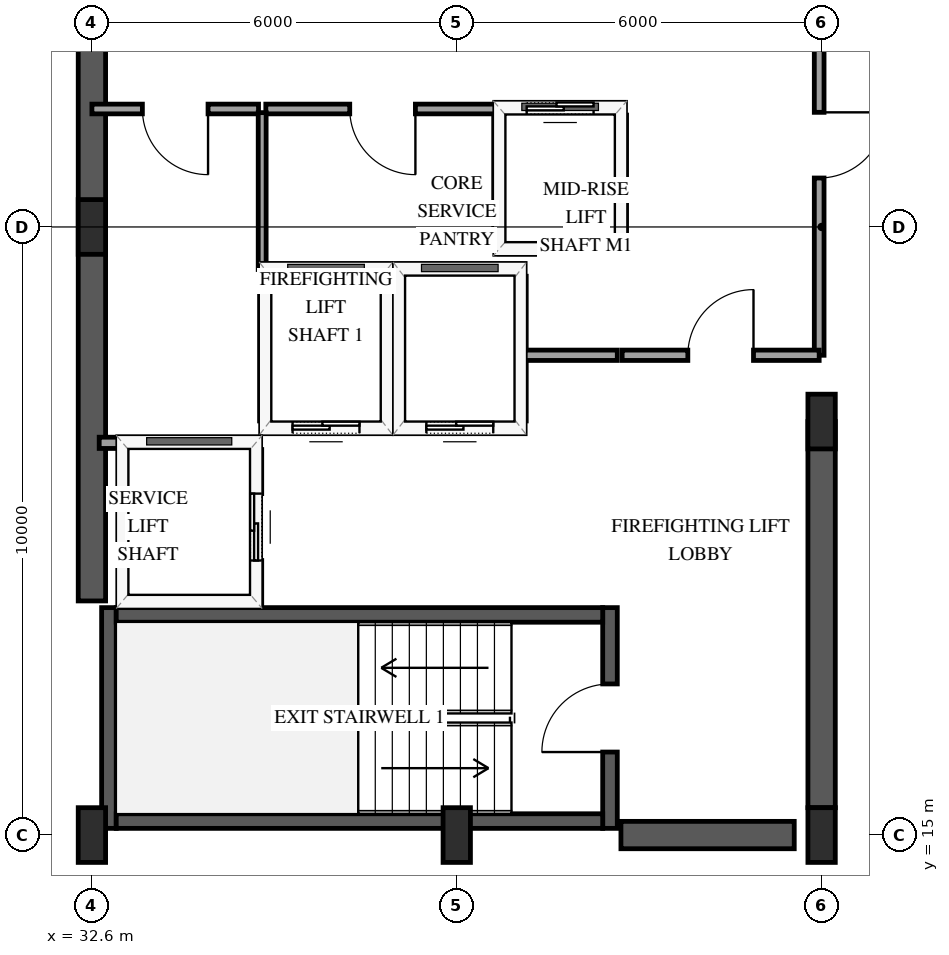
"""IFC4 building model, lengths in metres.
Left out: names, types, materials, properties, quantities, classifications, styles, units other than length and angle.
Written with IfcOpenShell. Run it as: python <this file> out.ifc"""

import sys

from ifc_helpers import new_model, si_unit, direction, frame, frame_2d, origin, origin_2d, place, context, subcontext, project, spatial, rectangle, extrude, element, fill, save


model = new_model("IFC4")
c1 = context("Model", 3, precision=1e-05, world=origin(), true_north=direction((0.0, 1.0)))
c2 = subcontext(c1, "Body", "Model", "MODEL_VIEW")
j1 = project(units=[si_unit("LENGTHUNIT", "METRE"), si_unit("PLANEANGLEUNIT", "RADIAN")], contexts=[c1])
p1 = place(None, origin())
s1 = spatial("IfcSite", under=j1, at=p1, CompositionType="ELEMENT")
p2 = place(p1, origin())
s2 = spatial("IfcBuilding", under=s1, at=p2, CompositionType="ELEMENT")
p3 = place(p2, frame((0.0, 0.0, 201.4)))
s3 = spatial("IfcBuildingStorey", under=s2, at=p3, CompositionType="ELEMENT", Elevation=201.4)
p4 = place(p3, frame((32.88, 15.11, 0.0), z_axis=(0.0, 0.0, 1.0), x_axis=(0.0, 1.0, 0.0)))
e1 = element("IfcWall", 1, at=p4, inside=s3, PredefinedType="SHEAR", context=c2, shape_type="SweptSolid", body=[
    extrude(rectangle(XDim=3.63, YDim=0.24, at=frame_2d((1.815, 0.0))), origin(), (0.0, 0.0, 1.0), 3.6),
])
p5 = place(p3, frame((41.12, 15.11, 0.0), z_axis=(0.0, 0.0, 1.0), x_axis=(0.0, 1.0, 0.0)))
e2 = element("IfcWall", 2, at=p5, inside=s3, PredefinedType="SHEAR", context=c2, shape_type="SweptSolid", body=[
    extrude(rectangle(XDim=3.63, YDim=0.24, at=frame_2d((1.815, 0.0))), origin(), (0.0, 0.0, 1.0), 3.6),
])
p6 = place(p5, frame((1.255, 0.0, 0.0)))
e3 = element("IfcOpeningElement", 3, at=p6, cuts=e2, PredefinedType="OPENING", context=c2, shape_type="SweptSolid", body=[
    extrude(rectangle(XDim=1.12, YDim=2.15, at=frame_2d((0.56, 1.075))), frame((0.0, 0.13, 0.0), z_axis=(0.0, -1.0, 0.0), x_axis=(1.0, 0.0, 0.0)), (0.0, 0.0, 1.0), 0.26),
])
for number, where, z_axis, x_axis in (
    (4, (33.0, 15.23, 0.0), (0.0, 0.0, 1.0), (1.0, 0.0, 0.0)),
    (5, (33.0, 18.62, 0.0), (0.0, 0.0, 1.0), (1.0, 0.0, 0.0)),
):
    element("IfcWall", number, at=place(p3, frame(where, z_axis=z_axis, x_axis=x_axis)), inside=s3, PredefinedType="SHEAR", context=c2, shape_type="SweptSolid", body=[
        extrude(rectangle(XDim=8.0, YDim=0.24, at=frame_2d((4.0, 0.0))), origin(), (0.0, 0.0, 1.0), 3.6),
    ])
p7 = place(p3, frame((32.6, 18.85, 0.0), z_axis=(0.0, 0.0, 1.0), x_axis=(0.0, 1.0, 0.0)))
e6 = element("IfcWall", 6, at=p7, inside=s3, PredefinedType="SHEAR", context=c2, shape_type="SweptSolid", body=[
    extrude(rectangle(XDim=12.3, YDim=0.45, at=frame_2d((6.15, 0.0))), origin(), (0.0, 0.0, 1.0), 3.6),
])
p8 = place(p3, frame((41.3, 15.0, 0.0), z_axis=(0.0, 0.0, 1.0), x_axis=(1.0, 0.0, 0.0)))
e7 = element("IfcWall", 7, at=p8, inside=s3, PredefinedType="SHEAR", context=c2, shape_type="SweptSolid", body=[
    extrude(rectangle(XDim=2.85, YDim=0.45, at=frame_2d((1.425, 0.0))), origin(), (0.0, 0.0, 1.0), 3.6),
])
p9 = place(p3, frame((44.6, 15.45, 0.0), z_axis=(0.0, 0.0, 1.0), x_axis=(0.0, 1.0, 0.0)))
e8 = element("IfcWall", 8, at=p9, inside=s3, PredefinedType="SHEAR", context=c2, shape_type="SweptSolid", body=[
    extrude(rectangle(XDim=6.35, YDim=0.45, at=frame_2d((3.175, 0.0))), origin(), (0.0, 0.0, 1.0), 3.6),
])
for number, where, z_axis, x_axis in (
    (9, (32.6, 15.0, 0.0), (0.0, 0.0, 1.0), (1.0, 0.0, 0.0)),
    (10, (32.6, 25.0, 0.0), (0.0, 0.0, 1.0), (1.0, 0.0, 0.0)),
    (11, (38.6, 15.0, 0.0), (0.0, 0.0, 1.0), (1.0, 0.0, 0.0)),
    (12, (44.6, 15.0, 0.0), (0.0, 0.0, 1.0), (1.0, 0.0, 0.0)),
    (13, (44.6, 21.8, 0.0), (0.0, 0.0, 1.0), (1.0, 0.0, 0.0)),
):
    element("IfcColumn", number, at=place(p3, frame(where, z_axis=z_axis, x_axis=x_axis)), inside=s3, PredefinedType="PILASTER", context=c2, shape_type="SweptSolid", body=[
        extrude(rectangle(XDim=0.45, YDim=0.9, at=origin_2d()), origin(), (0.0, 0.0, 1.0), 3.6),
    ])
p10 = place(p3, frame((35.45, 21.7, 0.0), z_axis=(0.0, 0.0, 1.0), x_axis=(1.0, 0.0, 0.0)))
e14 = element("IfcWall", 14, at=p10, inside=s3, PredefinedType="SOLIDWALL", context=c2, shape_type="SweptSolid", body=[
    extrude(rectangle(XDim=2.0, YDim=0.185, at=frame_2d((1.0, 0.0))), origin(), (0.0, 0.0, 1.0), 3.3),
])
p11 = place(p10, frame((0.45, 0.0, 0.0)))
e15 = element("IfcOpeningElement", 15, at=p11, cuts=e14, PredefinedType="OPENING", context=c2, shape_type="SweptSolid", body=[
    extrude(rectangle(XDim=1.1, YDim=2.15, at=frame_2d((0.55, 1.075))), frame((0.0, 0.103, 0.0), z_axis=(0.0, -1.0, 0.0), x_axis=(1.0, 0.0, 0.0)), (0.0, 0.0, 1.0), 0.205),
])
p12 = place(p3, frame((35.45, 24.3, 0.0), z_axis=(0.0, 0.0, 1.0), x_axis=(1.0, 0.0, 0.0)))
e16 = element("IfcWall", 16, at=p12, inside=s3, PredefinedType="SOLIDWALL", context=c2, shape_type="SweptSolid", body=[
    extrude(rectangle(XDim=2.0, YDim=0.185, at=frame_2d((1.0, 0.0))), origin(), (0.0, 0.0, 1.0), 3.3),
])
for number, where, z_axis, x_axis in (
    (17, (35.45, 21.81, 0.0), (0.0, 0.0, 1.0), (0.0, 1.0, 0.0)),
    (18, (37.45, 21.81, 0.0), (0.0, 0.0, 1.0), (0.0, 1.0, 0.0)),
):
    element("IfcWall", number, at=place(p3, frame(where, z_axis=z_axis, x_axis=x_axis)), inside=s3, PredefinedType="SOLIDWALL", context=c2, shape_type="SweptSolid", body=[
        extrude(rectangle(XDim=2.38, YDim=0.185, at=frame_2d((1.19, 0.0))), origin(), (0.0, 0.0, 1.0), 3.3),
    ])
p13 = place(p3, frame((37.65, 21.7, 0.0), z_axis=(0.0, 0.0, 1.0), x_axis=(1.0, 0.0, 0.0)))
e19 = element("IfcWall", 19, at=p13, inside=s3, PredefinedType="SOLIDWALL", context=c2, shape_type="SweptSolid", body=[
    extrude(rectangle(XDim=2.0, YDim=0.185, at=frame_2d((1.0, 0.0))), origin(), (0.0, 0.0, 1.0), 3.3),
])
p14 = place(p13, frame((0.45, 0.0, 0.0)))
e20 = element("IfcOpeningElement", 20, at=p14, cuts=e19, PredefinedType="OPENING", context=c2, shape_type="SweptSolid", body=[
    extrude(rectangle(XDim=1.1, YDim=2.15, at=frame_2d((0.55, 1.075))), frame((0.0, 0.103, 0.0), z_axis=(0.0, -1.0, 0.0), x_axis=(1.0, 0.0, 0.0)), (0.0, 0.0, 1.0), 0.205),
])
p15 = place(p3, frame((37.65, 24.3, 0.0), z_axis=(0.0, 0.0, 1.0), x_axis=(1.0, 0.0, 0.0)))
e21 = element("IfcWall", 21, at=p15, inside=s3, PredefinedType="SOLIDWALL", context=c2, shape_type="SweptSolid", body=[
    extrude(rectangle(XDim=2.0, YDim=0.185, at=frame_2d((1.0, 0.0))), origin(), (0.0, 0.0, 1.0), 3.3),
])
p16 = place(p3, frame((39.65, 21.81, 0.0), z_axis=(0.0, 0.0, 1.0), x_axis=(0.0, 1.0, 0.0)))
e22 = element("IfcWall", 22, at=p16, inside=s3, PredefinedType="SOLIDWALL", context=c2, shape_type="SweptSolid", body=[
    extrude(rectangle(XDim=2.38, YDim=0.185, at=frame_2d((1.19, 0.0))), origin(), (0.0, 0.0, 1.0), 3.3),
])
p17 = place(p3, frame((32.72, 21.45, 0.0), z_axis=(0.0, 0.0, 1.0), x_axis=(1.0, 0.0, 0.0)))
e23 = element("IfcWall", 23, at=p17, inside=s3, PredefinedType="SOLIDWALL", context=c2, shape_type="SweptSolid", body=[
    extrude(rectangle(XDim=2.58, YDim=0.185, at=frame_2d((1.29, 0.0))), origin(), (0.0, 0.0, 1.0), 3.3),
])
p18 = place(p3, frame((35.3, 18.79, 0.0), z_axis=(0.0, 0.0, 1.0), x_axis=(0.0, 1.0, 0.0)))
e24 = element("IfcWall", 24, at=p18, inside=s3, PredefinedType="SOLIDWALL", context=c2, shape_type="SweptSolid", body=[
    extrude(rectangle(XDim=2.55, YDim=0.185, at=frame_2d((1.275, 0.0))), origin(), (0.0, 0.0, 1.0), 3.3),
])
p19 = place(p18, frame((0.725, 0.0, 0.0)))
e25 = element("IfcOpeningElement", 25, at=p19, cuts=e24, PredefinedType="OPENING", context=c2, shape_type="SweptSolid", body=[
    extrude(rectangle(XDim=1.1, YDim=2.15, at=frame_2d((0.55, 1.075))), frame((0.0, 0.103, 0.0), z_axis=(0.0, -1.0, 0.0), x_axis=(1.0, 0.0, 0.0)), (0.0, 0.0, 1.0), 0.205),
])
p20 = place(p3, frame((39.3, 24.65, 0.0), z_axis=(0.0, 0.0, 1.0), x_axis=(1.0, 0.0, 0.0)))
e26 = element("IfcWall", 26, at=p20, inside=s3, PredefinedType="SOLIDWALL", context=c2, shape_type="SweptSolid", body=[
    extrude(rectangle(XDim=2.0, YDim=0.185, at=frame_2d((1.0, 0.0))), origin(), (0.0, 0.0, 1.0), 3.3),
])
p21 = place(p3, frame((39.3, 26.95, 0.0), z_axis=(0.0, 0.0, 1.0), x_axis=(1.0, 0.0, 0.0)))
e27 = element("IfcWall", 27, at=p21, inside=s3, PredefinedType="SOLIDWALL", context=c2, shape_type="SweptSolid", body=[
    extrude(rectangle(XDim=2.0, YDim=0.185, at=frame_2d((1.0, 0.0))), origin(), (0.0, 0.0, 1.0), 3.3),
])
p22 = place(p21, frame((0.45, 0.0, 0.0)))
e28 = element("IfcOpeningElement", 28, at=p22, cuts=e27, PredefinedType="OPENING", context=c2, shape_type="SweptSolid", body=[
    extrude(rectangle(XDim=1.1, YDim=2.15, at=frame_2d((0.55, 1.075))), frame((0.0, 0.103, 0.0), z_axis=(0.0, -1.0, 0.0), x_axis=(1.0, 0.0, 0.0)), (0.0, 0.0, 1.0), 0.205),
])
for number, where, z_axis, x_axis in (
    (29, (39.3, 24.76, 0.0), (0.0, 0.0, 1.0), (0.0, 1.0, 0.0)),
    (30, (41.3, 24.76, 0.0), (0.0, 0.0, 1.0), (0.0, 1.0, 0.0)),
):
    element("IfcWall", number, at=place(p3, frame(where, z_axis=z_axis, x_axis=x_axis)), inside=s3, PredefinedType="SOLIDWALL", context=c2, shape_type="SweptSolid", body=[
        extrude(rectangle(XDim=2.08, YDim=0.185, at=frame_2d((1.04, 0.0))), origin(), (0.0, 0.0, 1.0), 3.3),
    ])
p23 = place(p3, frame((44.56, 29.8, 0.0), z_axis=(0.0, 0.0, 1.0), x_axis=(0.0, -1.0, 0.0)))
e31 = element("IfcWall", 31, at=p23, inside=s3, PredefinedType="PARTITIONING", context=c2, shape_type="SweptSolid", body=[
    extrude(rectangle(XDim=6.91, YDim=0.16, at=frame_2d((3.455, 0.0))), origin(), (0.0, 0.0, 1.0), 2.34),
])
p24 = place(p23, frame((2.915, 0.0, 0.0)))
e32 = element("IfcOpeningElement", 32, at=p24, cuts=e31, PredefinedType="OPENING", context=c2, shape_type="SweptSolid", body=[
    extrude(rectangle(XDim=1.08, YDim=2.15, at=frame_2d((0.54, 1.075))), frame((0.0, 0.09, 0.0), z_axis=(0.0, -1.0, 0.0), x_axis=(1.0, 0.0, 0.0)), (0.0, 0.0, 1.0), 0.18),
])
p25 = place(p3, frame((39.3, 26.94, 0.0), z_axis=(0.0, 0.0, 1.0), x_axis=(-1.0, 0.0, 0.0)))
e33 = element("IfcWall", 33, at=p25, inside=s3, PredefinedType="PARTITIONING", context=c2, shape_type="SweptSolid", body=[
    extrude(rectangle(XDim=3.84, YDim=0.16, at=frame_2d((1.92, 0.0))), origin(), (0.0, 0.0, 1.0), 3.3),
])
p26 = place(p25, frame((1.38, 0.0, 0.0)))
e34 = element("IfcOpeningElement", 34, at=p26, cuts=e33, PredefinedType="OPENING", context=c2, shape_type="SweptSolid", body=[
    extrude(rectangle(XDim=1.08, YDim=2.15, at=frame_2d((0.54, 1.075))), frame((0.0, 0.09, 0.0), z_axis=(0.0, -1.0, 0.0), x_axis=(1.0, 0.0, 0.0)), (0.0, 0.0, 1.0), 0.18),
])
p27 = place(p3, frame((41.32, 22.89, 0.0), z_axis=(0.0, 0.0, 1.0), x_axis=(1.0, 0.0, 0.0)))
e35 = element("IfcWall", 35, at=p27, inside=s3, PredefinedType="PARTITIONING", context=c2, shape_type="SweptSolid", body=[
    extrude(rectangle(XDim=3.24, YDim=0.17, at=frame_2d((1.62, 0.0))), origin(), (0.0, 0.0, 1.0), 3.3),
])
p28 = place(p27, frame((1.08, 0.0, 0.0)))
e36 = element("IfcOpeningElement", 36, at=p28, cuts=e35, PredefinedType="OPENING", context=c2, shape_type="SweptSolid", body=[
    extrude(rectangle(XDim=1.08, YDim=2.15, at=frame_2d((0.54, 1.075))), frame((0.0, 0.095, 0.0), z_axis=(0.0, -1.0, 0.0), x_axis=(1.0, 0.0, 0.0)), (0.0, 0.0, 1.0), 0.19),
])
p29 = place(p3, frame((35.34, 26.94, 0.0), z_axis=(0.0, 0.0, 1.0), x_axis=(-1.0, 0.0, 0.0)))
e37 = element("IfcWall", 37, at=p29, inside=s3, PredefinedType="PARTITIONING", context=c2, shape_type="SweptSolid", body=[
    extrude(rectangle(XDim=2.74, YDim=0.16, at=frame_2d((1.37, 0.0))), origin(), (0.0, 0.0, 1.0), 3.3),
])
p30 = place(p29, frame((0.83, 0.0, 0.0)))
e38 = element("IfcOpeningElement", 38, at=p30, cuts=e37, PredefinedType="OPENING", context=c2, shape_type="SweptSolid", body=[
    extrude(rectangle(XDim=1.08, YDim=2.15, at=frame_2d((0.54, 1.075))), frame((0.0, 0.09, 0.0), z_axis=(0.0, -1.0, 0.0), x_axis=(1.0, 0.0, 0.0)), (0.0, 0.0, 1.0), 0.18),
])
p31 = place(p3, frame((35.4, 26.88, 0.0), z_axis=(0.0, 0.0, 1.0), x_axis=(0.0, -1.0, 0.0)))
e39 = element("IfcWall", 39, at=p31, inside=s3, PredefinedType="PARTITIONING", context=c2, shape_type="SweptSolid", body=[
    extrude(rectangle(XDim=2.58, YDim=0.13, at=frame_2d((1.29, 0.0))), origin(), (0.0, 0.0, 1.0), 3.3),
])
p32 = place(p3, frame((39.72, 22.89, 0.0), z_axis=(0.0, 0.0, 1.0), x_axis=(1.0, 0.0, 0.0)))
e40 = element("IfcWall", 40, at=p32, inside=s3, PredefinedType="PARTITIONING", context=c2, shape_type="SweptSolid", body=[
    extrude(rectangle(XDim=1.52, YDim=0.17, at=frame_2d((0.76, 0.0))), origin(), (0.0, 0.0, 1.0), 3.3),
])
p33 = place(p11, origin())
e41 = element("IfcDoor", 41, at=p33, inside=s3, OperationType="SLIDING_TO_LEFT", PredefinedType="DOOR", context=c2, shape_type="SweptSolid", body=[
    extrude(rectangle(XDim=1.1, YDim=2.15, at=frame_2d((0.55, 1.075))), frame((0.0, 0.025, 0.0), z_axis=(0.0, -1.0, 0.0), x_axis=(1.0, 0.0, 0.0)), (0.0, 0.0, 1.0), 0.05),
])
fill(e15, e41)
p34 = place(p14, origin())
e42 = element("IfcDoor", 42, at=p34, inside=s3, OperationType="SLIDING_TO_LEFT", PredefinedType="DOOR", context=c2, shape_type="SweptSolid", body=[
    extrude(rectangle(XDim=1.1, YDim=2.15, at=frame_2d((0.55, 1.075))), frame((0.0, 0.025, 0.0), z_axis=(0.0, -1.0, 0.0), x_axis=(1.0, 0.0, 0.0)), (0.0, 0.0, 1.0), 0.05),
])
fill(e20, e42)
p35 = place(p19, origin())
e43 = element("IfcDoor", 43, at=p35, inside=s3, OperationType="SLIDING_TO_LEFT", PredefinedType="DOOR", context=c2, shape_type="SweptSolid", body=[
    extrude(rectangle(XDim=1.1, YDim=2.15, at=frame_2d((0.55, 1.075))), frame((0.0, 0.025, 0.0), z_axis=(0.0, -1.0, 0.0), x_axis=(1.0, 0.0, 0.0)), (0.0, 0.0, 1.0), 0.05),
])
fill(e25, e43)
p36 = place(p22, origin())
e44 = element("IfcDoor", 44, at=p36, inside=s3, OperationType="SLIDING_TO_LEFT", PredefinedType="DOOR", context=c2, shape_type="SweptSolid", body=[
    extrude(rectangle(XDim=1.1, YDim=2.15, at=frame_2d((0.55, 1.075))), frame((0.0, 0.025, 0.0), z_axis=(0.0, -1.0, 0.0), x_axis=(1.0, 0.0, 0.0)), (0.0, 0.0, 1.0), 0.05),
])
fill(e28, e44)
p37 = place(p6, origin())
e45 = element("IfcDoor", 45, at=p37, inside=s3, OperationType="SINGLE_SWING_LEFT", PredefinedType="DOOR", context=c2, shape_type="SweptSolid", body=[
    extrude(rectangle(XDim=1.12, YDim=2.15, at=frame_2d((0.56, 1.075))), frame((0.0, 0.025, 0.0), z_axis=(0.0, -1.0, 0.0), x_axis=(1.0, 0.0, 0.0)), (0.0, 0.0, 1.0), 0.05),
])
fill(e3, e45)
p38 = place(p24, origin())
e46 = element("IfcDoor", 46, at=p38, inside=s3, OperationType="SINGLE_SWING_LEFT", PredefinedType="DOOR", context=c2, shape_type="SweptSolid", body=[
    extrude(rectangle(XDim=1.08, YDim=2.15, at=frame_2d((0.54, 1.075))), frame((0.0, 0.025, 0.0), z_axis=(0.0, -1.0, 0.0), x_axis=(1.0, 0.0, 0.0)), (0.0, 0.0, 1.0), 0.05),
])
fill(e32, e46)
p39 = place(p26, origin())
e47 = element("IfcDoor", 47, at=p39, inside=s3, OperationType="SINGLE_SWING_LEFT", PredefinedType="DOOR", context=c2, shape_type="SweptSolid", body=[
    extrude(rectangle(XDim=1.08, YDim=2.15, at=frame_2d((0.54, 1.075))), frame((0.0, 0.025, 0.0), z_axis=(0.0, -1.0, 0.0), x_axis=(1.0, 0.0, 0.0)), (0.0, 0.0, 1.0), 0.05),
])
fill(e34, e47)
p40 = place(p28, origin())
e48 = element("IfcDoor", 48, at=p40, inside=s3, OperationType="SINGLE_SWING_RIGHT", PredefinedType="DOOR", context=c2, shape_type="SweptSolid", body=[
    extrude(rectangle(XDim=1.08, YDim=2.15, at=frame_2d((0.54, 1.075))), frame((0.0, 0.025, 0.0), z_axis=(0.0, -1.0, 0.0), x_axis=(1.0, 0.0, 0.0)), (0.0, 0.0, 1.0), 0.05),
])
fill(e36, e48)
p41 = place(p30, origin())
e49 = element("IfcDoor", 49, at=p41, inside=s3, OperationType="SINGLE_SWING_LEFT", PredefinedType="DOOR", context=c2, shape_type="SweptSolid", body=[
    extrude(rectangle(XDim=1.08, YDim=2.15, at=frame_2d((0.54, 1.075))), frame((0.0, 0.025, 0.0), z_axis=(0.0, -1.0, 0.0), x_axis=(1.0, 0.0, 0.0)), (0.0, 0.0, 1.0), 0.05),
])
fill(e38, e49)
save(model, sys.argv[1])
